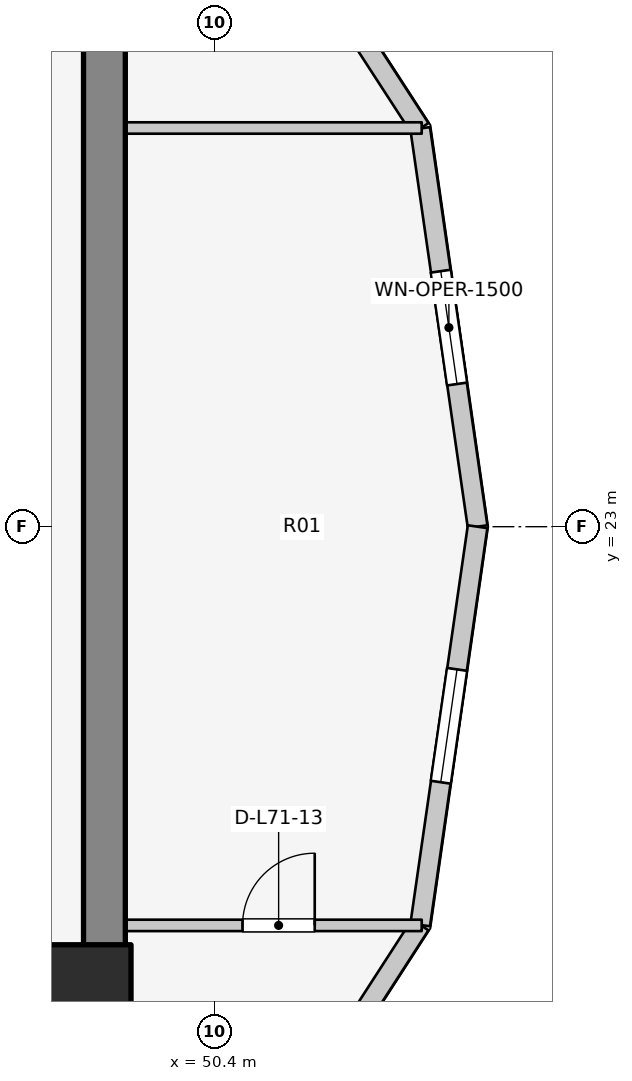
"""IFC4 building model, lengths in metres.
Left out: names, types, materials, properties, quantities, classifications, styles, units other than length and angle.
Written with IfcOpenShell. Run it as: python <this file> out.ifc"""

import sys

from ifc_helpers import new_model, si_unit, direction, frame, frame_2d, origin, origin_2d, place, context, subcontext, project, spatial, rectangle, extrude, element, fill, save


model = new_model("IFC4")
c1 = context("Model", 3, precision=1e-05, world=origin(), true_north=direction((0.0, 1.0)))
c2 = subcontext(c1, "Body", "Model", "MODEL_VIEW")
j1 = project(units=[si_unit("LENGTHUNIT", "METRE"), si_unit("PLANEANGLEUNIT", "RADIAN")], contexts=[c1])
p1 = place(None, origin())
s1 = spatial("IfcSite", under=j1, at=p1, CompositionType="ELEMENT")
p2 = place(p1, origin())
s2 = spatial("IfcBuilding", under=s1, at=p2, CompositionType="ELEMENT")
p3 = place(p2, frame((0.0, 0.0, 232.6)))
s3 = spatial("IfcBuildingStorey", under=s2, at=p3, CompositionType="ELEMENT", Elevation=232.6)
p4 = place(p3, frame((48.95, 17.05, 0.0), z_axis=(0.0, 0.0, 1.0), x_axis=(0.0, 1.0, 0.0)))
e1 = element("IfcWall", 1, at=p4, inside=s3, PredefinedType="SHEAR", context=c2, shape_type="SweptSolid", body=[
    extrude(rectangle(XDim=12.8, YDim=0.55, at=frame_2d((6.4, 0.0))), origin(), (0.0, 0.0, 1.0), 3.1),
])
p5 = place(p3, frame((48.7, 16.9, 0.0), z_axis=(0.0, 0.0, 1.0), x_axis=(1.0, 0.0, 0.0)))
e2 = element("IfcColumn", 2, at=p5, inside=s3, PredefinedType="COLUMN", context=c2, shape_type="SweptSolid", body=[
    extrude(rectangle(XDim=1.2, YDim=1.2, at=origin_2d()), origin(), (0.0, 0.0, 1.0), 3.1),
])
p6 = place(p3, frame((53.86, 23.0, 0.0), z_axis=(0.0, 0.0, 1.0), x_axis=(-0.142712754019, 0.989764148593, 0.0)))
e3 = element("IfcWall", 3, at=p6, inside=s3, PredefinedType="STANDARD", context=c2, shape_type="SweptSolid", body=[
    extrude(rectangle(XDim=5.293, YDim=0.26, at=frame_2d((2.646, 0.0))), origin(), (0.0, 0.0, 1.0), 2.85),
])
p7 = place(p6, frame((1.896, 0.0, 0.75)))
e4 = element("IfcOpeningElement", 4, at=p7, cuts=e3, PredefinedType="OPENING", context=c2, shape_type="SweptSolid", body=[
    extrude(rectangle(XDim=1.5, YDim=1.6, at=frame_2d((0.75, 0.8))), frame((0.0, 0.14, 0.0), z_axis=(0.0, -1.0, 0.0), x_axis=(1.0, 0.0, 0.0)), (0.0, 0.0, 1.0), 0.28),
])
p8 = place(p3, frame((53.105, 28.239, 0.0), z_axis=(0.0, 0.0, 1.0), x_axis=(-0.544475908819, 0.838776480784, 0.0)))
e5 = element("IfcWall", 5, at=p8, inside=s3, PredefinedType="STANDARD", context=c2, shape_type="SweptSolid", body=[
    extrude(rectangle(XDim=4.305, YDim=0.26, at=frame_2d((2.152, 0.0))), origin(), (0.0, 0.0, 1.0), 2.85),
])
p9 = place(p8, frame((1.402, 0.0, 0.75)))
e6 = element("IfcOpeningElement", 6, at=p9, cuts=e5, PredefinedType="OPENING", context=c2, shape_type="SweptSolid", body=[
    extrude(rectangle(XDim=1.5, YDim=1.6, at=frame_2d((0.75, 0.8))), frame((0.0, 0.14, 0.0), z_axis=(0.0, -1.0, 0.0), x_axis=(1.0, 0.0, 0.0)), (0.0, 0.0, 1.0), 0.28),
])
p10 = place(p3, frame((50.761, 14.133, 0.0), z_axis=(0.0, 0.0, 1.0), x_axis=(0.542641766008, 0.839964233634, 0.0)))
e7 = element("IfcWall", 7, at=p10, inside=s3, PredefinedType="STANDARD", context=c2, shape_type="SweptSolid", body=[
    extrude(rectangle(XDim=4.319, YDim=0.26, at=frame_2d((2.16, 0.0))), origin(), (0.0, 0.0, 1.0), 2.85),
])
p11 = place(p10, frame((1.41, 0.0, 0.75)))
e8 = element("IfcOpeningElement", 8, at=p11, cuts=e7, PredefinedType="OPENING", context=c2, shape_type="SweptSolid", body=[
    extrude(rectangle(XDim=1.5, YDim=1.6, at=frame_2d((0.75, 0.8))), frame((0.0, 0.14, 0.0), z_axis=(0.0, -1.0, 0.0), x_axis=(1.0, 0.0, 0.0)), (0.0, 0.0, 1.0), 0.28),
])
p12 = place(p3, frame((53.105, 17.761, 0.0), z_axis=(0.0, 0.0, 1.0), x_axis=(0.142712754019, 0.989764148593, 0.0)))
e9 = element("IfcWall", 9, at=p12, inside=s3, PredefinedType="STANDARD", context=c2, shape_type="SweptSolid", body=[
    extrude(rectangle(XDim=5.293, YDim=0.26, at=frame_2d((2.646, 0.0))), origin(), (0.0, 0.0, 1.0), 2.85),
])
p13 = place(p12, frame((1.896, 0.0, 0.75)))
e10 = element("IfcOpeningElement", 10, at=p13, cuts=e9, PredefinedType="OPENING", context=c2, shape_type="SweptSolid", body=[
    extrude(rectangle(XDim=1.5, YDim=1.6, at=frame_2d((0.75, 0.8))), frame((0.0, 0.14, 0.0), z_axis=(0.0, -1.0, 0.0), x_axis=(1.0, 0.0, 0.0)), (0.0, 0.0, 1.0), 0.28),
])
p14 = place(p3, frame((48.95, 17.755, 0.0), z_axis=(0.0, 0.0, 1.0), x_axis=(1.0, 0.0, 0.0)))
e11 = element("IfcWall", 11, at=p14, inside=s3, PredefinedType="PARTITIONING", context=c2, shape_type="SweptSolid", body=[
    extrude(rectangle(XDim=4.175, YDim=0.15, at=frame_2d((2.087, 0.0))), origin(), (0.0, 0.0, 1.0), 2.855),
])
p15 = place(p14, frame((1.817, 0.0, 0.0)))
e12 = element("IfcOpeningElement", 12, at=p15, cuts=e11, PredefinedType="OPENING", context=c2, shape_type="SweptSolid", body=[
    extrude(rectangle(XDim=0.95, YDim=2.1, at=frame_2d((0.475, 1.05))), frame((0.0, 0.085, 0.0), z_axis=(0.0, -1.0, 0.0), x_axis=(1.0, 0.0, 0.0)), (0.0, 0.0, 1.0), 0.17),
])
p16 = place(p3, frame((48.95, 28.245, 0.0), z_axis=(0.0, 0.0, 1.0), x_axis=(1.0, 0.0, 0.0)))
e13 = element("IfcWall", 13, at=p16, inside=s3, PredefinedType="PARTITIONING", context=c2, shape_type="SweptSolid", body=[
    extrude(rectangle(XDim=4.175, YDim=0.15, at=frame_2d((2.087, 0.0))), origin(), (0.0, 0.0, 1.0), 2.855),
])
p17 = place(p7, origin())
e14 = element("IfcWindow", 14, at=p17, inside=s3, PartitioningType="SINGLE_PANEL", PredefinedType="WINDOW", context=c2, shape_type="SweptSolid", body=[
    extrude(rectangle(XDim=1.5, YDim=1.6, at=frame_2d((0.75, 0.8))), frame((0.0, 0.03, 0.0), z_axis=(0.0, -1.0, 0.0), x_axis=(1.0, 0.0, 0.0)), (0.0, 0.0, 1.0), 0.06),
])
fill(e4, e14)
p18 = place(p13, origin())
e15 = element("IfcWindow", 15, at=p18, inside=s3, PartitioningType="SINGLE_PANEL", PredefinedType="WINDOW", context=c2, shape_type="SweptSolid", body=[
    extrude(rectangle(XDim=1.5, YDim=1.6, at=frame_2d((0.75, 0.8))), frame((0.0, 0.03, 0.0), z_axis=(0.0, -1.0, 0.0), x_axis=(1.0, 0.0, 0.0)), (0.0, 0.0, 1.0), 0.06),
])
fill(e10, e15)
p19 = place(p15, origin())
e16 = element("IfcDoor", 16, at=p19, inside=s3, OperationType="SINGLE_SWING_RIGHT", PredefinedType="DOOR", context=c2, shape_type="SweptSolid", body=[
    extrude(rectangle(XDim=0.95, YDim=2.1, at=frame_2d((0.475, 1.05))), frame((0.0, 0.025, 0.0), z_axis=(0.0, -1.0, 0.0), x_axis=(1.0, 0.0, 0.0)), (0.0, 0.0, 1.0), 0.05),
])
fill(e12, e16)
save(model, sys.argv[1])
